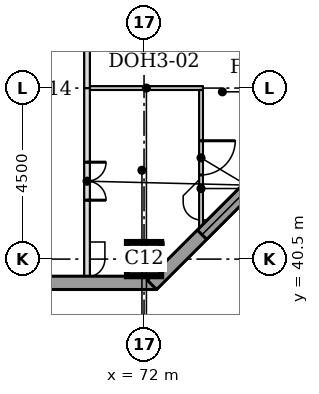
"""IFC4 building model, lengths in metres.
Left out: names, types, materials, properties, quantities, classifications, styles, units other than length and angle.
Written with IfcOpenShell. Run it as: python <this file> out.ifc"""

import sys

from ifc_helpers import new_model, si_unit, direction, frame, frame_2d, origin, origin_2d, place, context, subcontext, project, spatial, rectangle, extrude, element, fill, save


model = new_model("IFC4")
c1 = context("Model", 3, precision=1e-05, world=origin(), true_north=direction((0.0, 1.0)))
c2 = subcontext(c1, "Body", "Model", "MODEL_VIEW")
j1 = project(units=[si_unit("LENGTHUNIT", "METRE"), si_unit("PLANEANGLEUNIT", "RADIAN")], contexts=[c1])
p1 = place(None, origin())
s1 = spatial("IfcSite", under=j1, at=p1, CompositionType="ELEMENT")
p2 = place(p1, origin())
s2 = spatial("IfcBuilding", under=s1, at=p2, CompositionType="ELEMENT")
p3 = place(p2, frame((0.0, 0.0, 166.2)))
s3 = spatial("IfcBuildingStorey", under=s2, at=p3, CompositionType="ELEMENT", Elevation=166.2)
p4 = place(p3, frame((72.0, 40.5, 0.0), z_axis=(0.0, 0.0, 1.0), x_axis=(1.0, 0.0, 0.0)))
e1 = element("IfcColumn", 1, at=p4, inside=s3, PredefinedType="COLUMN", context=c2, shape_type="SweptSolid", body=[
    extrude(rectangle(XDim=0.9, YDim=0.9, at=origin_2d()), origin(), (0.0, 0.0, 1.0), 3.7),
])
p5 = place(p3, frame((36.0, 39.875, 0.0), z_axis=(0.0, 0.0, 1.0), x_axis=(1.0, 0.0, 0.0)))
e2 = element("IfcWall", 2, at=p5, inside=s3, PredefinedType="STANDARD", context=c2, shape_type="SweptSolid", body=[
    extrude(rectangle(XDim=36.331, YDim=0.35, at=frame_2d((18.166, 0.0))), origin(), (0.0, 0.0, 1.0), 3.525),
])
p6 = place(p5, frame((5.1, 0.0, 0.9)))
e3 = element("IfcOpeningElement", 3, at=p6, cuts=e2, PredefinedType="OPENING", context=c2, shape_type="SweptSolid", body=[
    extrude(rectangle(XDim=3.3, YDim=1.9, at=frame_2d((1.65, 0.95))), frame((0.0, 0.185, 0.0), z_axis=(0.0, -1.0, 0.0), x_axis=(1.0, 0.0, 0.0)), (0.0, 0.0, 1.0), 0.37),
])
p7 = place(p5, frame((9.6, 0.0, 0.9)))
e4 = element("IfcOpeningElement", 4, at=p7, cuts=e2, PredefinedType="OPENING", context=c2, shape_type="SweptSolid", body=[
    extrude(rectangle(XDim=3.3, YDim=1.9, at=frame_2d((1.65, 0.95))), frame((0.0, 0.185, 0.0), z_axis=(0.0, -1.0, 0.0), x_axis=(1.0, 0.0, 0.0)), (0.0, 0.0, 1.0), 0.37),
])
p8 = place(p5, frame((14.1, 0.0, 0.9)))
e5 = element("IfcOpeningElement", 5, at=p8, cuts=e2, PredefinedType="OPENING", context=c2, shape_type="SweptSolid", body=[
    extrude(rectangle(XDim=3.3, YDim=1.9, at=frame_2d((1.65, 0.95))), frame((0.0, 0.185, 0.0), z_axis=(0.0, -1.0, 0.0), x_axis=(1.0, 0.0, 0.0)), (0.0, 0.0, 1.0), 0.37),
])
p9 = place(p5, frame((18.6, 0.0, 0.9)))
e6 = element("IfcOpeningElement", 6, at=p9, cuts=e2, PredefinedType="OPENING", context=c2, shape_type="SweptSolid", body=[
    extrude(rectangle(XDim=3.3, YDim=1.9, at=frame_2d((1.65, 0.95))), frame((0.0, 0.185, 0.0), z_axis=(0.0, -1.0, 0.0), x_axis=(1.0, 0.0, 0.0)), (0.0, 0.0, 1.0), 0.37),
])
p10 = place(p5, frame((23.1, 0.0, 0.9)))
e7 = element("IfcOpeningElement", 7, at=p10, cuts=e2, PredefinedType="OPENING", context=c2, shape_type="SweptSolid", body=[
    extrude(rectangle(XDim=3.3, YDim=1.9, at=frame_2d((1.65, 0.95))), frame((0.0, 0.185, 0.0), z_axis=(0.0, -1.0, 0.0), x_axis=(1.0, 0.0, 0.0)), (0.0, 0.0, 1.0), 0.37),
])
p11 = place(p5, frame((27.6, 0.0, 0.9)))
e8 = element("IfcOpeningElement", 8, at=p11, cuts=e2, PredefinedType="OPENING", context=c2, shape_type="SweptSolid", body=[
    extrude(rectangle(XDim=3.3, YDim=1.9, at=frame_2d((1.65, 0.95))), frame((0.0, 0.185, 0.0), z_axis=(0.0, -1.0, 0.0), x_axis=(1.0, 0.0, 0.0)), (0.0, 0.0, 1.0), 0.37),
])
p12 = place(p3, frame((72.208, 39.824, 0.0), z_axis=(0.0, 0.0, 1.0), x_axis=(0.707106781187, 0.707106781187, 0.0)))
e9 = element("IfcWall", 9, at=p12, inside=s3, PredefinedType="STANDARD", context=c2, shape_type="SweptSolid", body=[
    extrude(rectangle(XDim=7.027, YDim=0.35, at=frame_2d((3.513, 0.0))), origin(), (0.0, 0.0, 1.0), 3.525),
])
p13 = place(p12, frame((1.863, 0.0, 0.9)))
e10 = element("IfcOpeningElement", 10, at=p13, cuts=e9, PredefinedType="OPENING", context=c2, shape_type="SweptSolid", body=[
    extrude(rectangle(XDim=3.3, YDim=1.9, at=frame_2d((1.65, 0.95))), frame((0.0, 0.185, 0.0), z_axis=(0.0, -1.0, 0.0), x_axis=(1.0, 0.0, 0.0)), (0.0, 0.0, 1.0), 0.37),
])
p14 = place(p3, frame((70.575, 45.0, 0.0), z_axis=(0.0, 0.0, 1.0), x_axis=(1.0, 0.0, 0.0)))
e11 = element("IfcWall", 11, at=p14, inside=s3, PredefinedType="PARTITIONING", context=c2, shape_type="SweptSolid", body=[
    extrude(rectangle(XDim=2.975, YDim=0.1, at=frame_2d((1.488, 0.0))), origin(), (0.0, 0.0, 1.0), 3.096),
])
p15 = place(p3, frame((70.5, 40.05, 0.0), z_axis=(0.0, 0.0, 1.0), x_axis=(0.0, 1.0, 0.0)))
e12 = element("IfcWall", 12, at=p15, inside=s3, PredefinedType="PARTITIONING", context=c2, shape_type="SweptSolid", body=[
    extrude(rectangle(XDim=4.95, YDim=0.15, at=frame_2d((2.475, 0.0))), origin(), (0.0, 0.0, 1.0), 3.55),
])
p16 = place(p15, frame((2.0, 0.0, 0.0)))
e13 = element("IfcOpeningElement", 13, at=p16, cuts=e12, PredefinedType="OPENING", context=c2, shape_type="SweptSolid", body=[
    extrude(rectangle(XDim=1.0, YDim=2.1, at=frame_2d((0.5, 1.05))), frame((0.0, 0.085, 0.0), z_axis=(0.0, -1.0, 0.0), x_axis=(1.0, 0.0, 0.0)), (0.0, 0.0, 1.0), 0.17),
])
p17 = place(p3, frame((73.5, 41.364, 0.0), z_axis=(0.0, 0.0, 1.0), x_axis=(0.0, 1.0, 0.0)))
e14 = element("IfcWall", 14, at=p17, inside=s3, PredefinedType="PARTITIONING", context=c2, shape_type="SweptSolid", body=[
    extrude(rectangle(XDim=3.586, YDim=0.1, at=frame_2d((1.793, 0.0))), origin(), (0.0, 0.0, 1.0), 3.55),
])
p18 = place(p17, frame((1.35, 0.0, 0.0)))
e15 = element("IfcOpeningElement", 15, at=p18, cuts=e14, PredefinedType="OPENING", context=c2, shape_type="SweptSolid", body=[
    extrude(rectangle(XDim=0.9, YDim=2.1, at=frame_2d((0.45, 1.05))), frame((0.0, 0.06, 0.0), z_axis=(0.0, -1.0, 0.0), x_axis=(1.0, 0.0, 0.0)), (0.0, 0.0, 1.0), 0.12),
])
p19 = place(p3, frame((70.5, 45.0, 0.0), z_axis=(0.0, 0.0, 1.0), x_axis=(0.0, 1.0, 0.0)))
e16 = element("IfcWall", 16, at=p19, inside=s3, PredefinedType="PARTITIONING", context=c2, shape_type="SweptSolid", body=[
    extrude(rectangle(XDim=1.5, YDim=0.15, at=frame_2d((0.75, 0.0))), origin(), (0.0, 0.0, 1.0), 3.55),
])
p20 = place(p13, origin())
e17 = element("IfcWindow", 17, at=p20, inside=s3, PartitioningType="SINGLE_PANEL", PredefinedType="WINDOW", context=c2, shape_type="SweptSolid", body=[
    extrude(rectangle(XDim=3.3, YDim=1.9, at=frame_2d((1.65, 0.95))), frame((0.0, 0.085, 0.0), z_axis=(0.0, -1.0, 0.0), x_axis=(1.0, 0.0, 0.0)), (0.0, 0.0, 1.0), 0.06),
])
fill(e10, e17)
p21 = place(p16, frame((1.0, 0.0, 0.0), z_axis=(0.0, 0.0, 1.0), x_axis=(-1.0, 0.0, 0.0)))
e18 = element("IfcDoor", 18, at=p21, inside=s3, OperationType="DOUBLE_DOOR_SINGLE_SWING", PredefinedType="DOOR", context=c2, shape_type="SweptSolid", body=[
    extrude(rectangle(XDim=1.0, YDim=2.1, at=frame_2d((0.5, 1.05))), frame((0.0, 0.025, 0.0), z_axis=(0.0, -1.0, 0.0), x_axis=(1.0, 0.0, 0.0)), (0.0, 0.0, 1.0), 0.05),
])
fill(e13, e18)
p22 = place(p18, frame((0.9, 0.0, 0.0), z_axis=(0.0, 0.0, 1.0), x_axis=(-1.0, 0.0, 0.0)))
e19 = element("IfcDoor", 19, at=p22, inside=s3, OperationType="SINGLE_SWING_LEFT", PredefinedType="DOOR", context=c2, shape_type="SweptSolid", body=[
    extrude(rectangle(XDim=0.9, YDim=2.1, at=frame_2d((0.45, 1.05))), frame((0.0, 0.025, 0.0), z_axis=(0.0, -1.0, 0.0), x_axis=(1.0, 0.0, 0.0)), (0.0, 0.0, 1.0), 0.05),
])
fill(e15, e19)
save(model, sys.argv[1])
